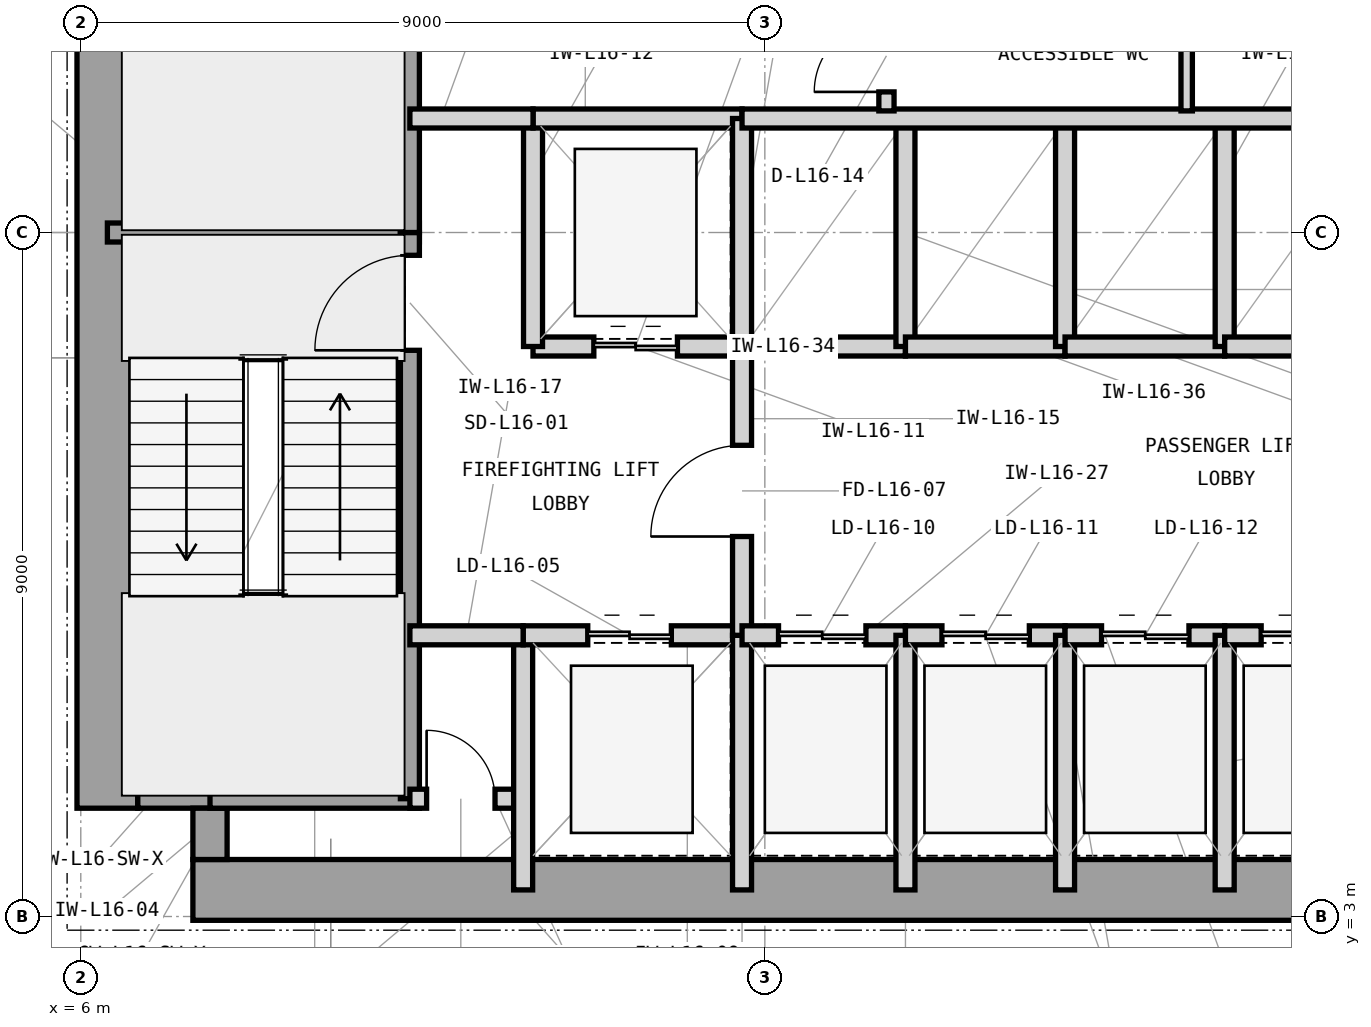
"""IFC4 building model, lengths in metres.
Left out: names, types, materials, properties, quantities, classifications, styles, units other than length and angle.
Written with IfcOpenShell. Run it as: python <this file> out.ifc"""

import sys

from ifc_helpers import new_model, si_unit, direction, frame, frame_2d, origin, place, context, subcontext, project, spatial, rectangle, extrude, element, fill, save


model = new_model("IFC4")
c1 = context("Model", 3, precision=1e-05, world=origin(), true_north=direction((0.0, 1.0)))
c2 = subcontext(c1, "Body", "Model", "MODEL_VIEW")
j1 = project(units=[si_unit("LENGTHUNIT", "METRE"), si_unit("PLANEANGLEUNIT", "RADIAN")], contexts=[c1])
p1 = place(None, origin())
s1 = spatial("IfcSite", under=j1, at=p1, CompositionType="ELEMENT")
p2 = place(p1, origin())
s2 = spatial("IfcBuilding", under=s1, at=p2, CompositionType="ELEMENT")
p3 = place(p2, frame((0.0, 0.0, 72.0)))
s3 = spatial("IfcBuildingStorey", under=s2, at=p3, CompositionType="ELEMENT", Elevation=72.0)
p4 = place(p3, frame((7.475, 3.35, 0.0), z_axis=(0.0, 0.0, 1.0), x_axis=(1.0, 0.0, 0.0)))
e1 = element("IfcWall", 1, at=p4, inside=s3, PredefinedType="SHEAR", context=c2, shape_type="SweptSolid", body=[
    extrude(rectangle(XDim=16.575, YDim=0.8, at=frame_2d((8.288, 0.0))), origin(), (0.0, 0.0, 1.0), 4.2),
])
p5 = place(p3, frame((6.35, 4.425, 0.0), z_axis=(0.0, 0.0, 1.0), x_axis=(0.0, 1.0, 0.0)))
e2 = element("IfcWall", 2, at=p5, inside=s3, PredefinedType="SHEAR", context=c2, shape_type="SweptSolid", body=[
    extrude(rectangle(XDim=15.15, YDim=0.8, at=frame_2d((7.575, 0.0))), origin(), (0.0, 0.0, 1.0), 4.2),
])
p6 = place(p3, frame((6.75, 4.65, 0.0), z_axis=(0.0, 0.0, 1.0), x_axis=(1.0, 0.0, 0.0)))
e3 = element("IfcWall", 3, at=p6, inside=s3, PredefinedType="SHEAR", context=c2, shape_type="SweptSolid", body=[
    extrude(rectangle(XDim=1.175, YDim=0.45, at=frame_2d((0.587, 0.0))), origin(), (0.0, 0.0, 1.0), 4.2),
])
p7 = place(p3, frame((7.7, 3.75, 0.0), z_axis=(0.0, 0.0, 1.0), x_axis=(0.0, 1.0, 0.0)))
e4 = element("IfcWall", 4, at=p7, inside=s3, PredefinedType="SHEAR", context=c2, shape_type="SweptSolid", body=[
    extrude(rectangle(XDim=0.675, YDim=0.45, at=frame_2d((0.337, 0.0))), origin(), (0.0, 0.0, 1.0), 4.2),
])
p8 = place(p3, frame((6.35, 12.0, 0.0), z_axis=(0.0, 0.0, 1.0), x_axis=(1.0, 0.0, 0.0)))
e5 = element("IfcWall", 5, at=p8, inside=s3, PredefinedType="SHEAR", context=c2, shape_type="SweptSolid", body=[
    extrude(rectangle(XDim=4.105, YDim=0.25, at=frame_2d((2.052, 0.0))), origin(), (0.0, 0.0, 1.0), 4.2),
])
p9 = place(p3, frame((7.7, 4.55, 0.0), z_axis=(0.0, 0.0, 1.0), x_axis=(1.0, 0.0, 0.0)))
e6 = element("IfcWall", 6, at=p9, inside=s3, PredefinedType="SHEAR", context=c2, shape_type="SweptSolid", body=[
    extrude(rectangle(XDim=2.755, YDim=0.25, at=frame_2d((1.377, 0.0))), origin(), (0.0, 0.0, 1.0), 4.2),
])
p10 = place(p3, frame((10.33, 4.55, 0.0), z_axis=(0.0, 0.0, 1.0), x_axis=(0.0, 1.0, 0.0)))
e7 = element("IfcWall", 7, at=p10, inside=s3, PredefinedType="SHEAR", context=c2, shape_type="SweptSolid", body=[
    extrude(rectangle(XDim=7.45, YDim=0.25, at=frame_2d((3.725, 0.0))), origin(), (0.0, 0.0, 1.0), 4.2),
])
p11 = place(p10, frame((5.9, 0.0, 0.0)))
e8 = element("IfcOpeningElement", 8, at=p11, cuts=e7, PredefinedType="OPENING", context=c2, shape_type="SweptSolid", body=[
    extrude(rectangle(XDim=1.25, YDim=2.2, at=frame_2d((0.625, 1.1))), frame((0.0, 0.135, 0.0), z_axis=(0.0, -1.0, 0.0), x_axis=(1.0, 0.0, 0.0)), (0.0, 0.0, 1.0), 0.27),
])
p12 = place(p3, frame((10.33, 12.0, 0.0), z_axis=(0.0, 0.0, 1.0), x_axis=(0.0, 1.0, 0.0)))
e9 = element("IfcWall", 9, at=p12, inside=s3, PredefinedType="SHEAR", context=c2, shape_type="SweptSolid", body=[
    extrude(rectangle(XDim=7.45, YDim=0.25, at=frame_2d((3.725, 0.0))), origin(), (0.0, 0.0, 1.0), 4.2),
])
p13 = place(p12, frame((5.85, 0.0, 0.0)))
e10 = element("IfcOpeningElement", 10, at=p13, cuts=e9, PredefinedType="OPENING", context=c2, shape_type="SweptSolid", body=[
    extrude(rectangle(XDim=1.25, YDim=2.2, at=frame_2d((0.625, 1.1))), frame((0.0, 0.135, 0.0), z_axis=(0.0, -1.0, 0.0), x_axis=(1.0, 0.0, 0.0)), (0.0, 0.0, 1.0), 0.27),
])
p14 = place(p3, frame((10.33, 4.55, 0.0), z_axis=(0.0, 0.0, 1.0), x_axis=(1.0, 0.0, 0.0)))
e11 = element("IfcWall", 11, at=p14, inside=s3, PredefinedType="PARTITIONING", context=c2, shape_type="SweptSolid", body=[
    extrude(rectangle(XDim=1.49, YDim=0.25, at=frame_2d((0.745, 0.0))), origin(), (0.0, 0.0, 1.0), 3.97),
])
p15 = place(p14, frame((0.22, 0.0, 0.0)))
e12 = element("IfcOpeningElement", 12, at=p15, cuts=e11, PredefinedType="OPENING", context=c2, shape_type="SweptSolid", body=[
    extrude(rectangle(XDim=0.9, YDim=2.1, at=frame_2d((0.45, 1.05))), frame((0.0, 0.135, 0.0), z_axis=(0.0, -1.0, 0.0), x_axis=(1.0, 0.0, 0.0)), (0.0, 0.0, 1.0), 0.27),
])
p16 = place(p3, frame((11.82, 3.35, 0.0), z_axis=(0.0, 0.0, 1.0), x_axis=(0.0, 1.0, 0.0)))
e13 = element("IfcWall", 13, at=p16, inside=s3, PredefinedType="PARTITIONING", context=c2, shape_type="SweptSolid", body=[
    extrude(rectangle(XDim=3.35, YDim=0.25, at=frame_2d((1.675, 0.0))), origin(), (0.0, 0.0, 1.0), 3.97),
])
p17 = place(p3, frame((11.82, 6.7, 0.0), z_axis=(0.0, 0.0, 1.0), x_axis=(1.0, 0.0, 0.0)))
e14 = element("IfcWall", 14, at=p17, inside=s3, PredefinedType="PARTITIONING", context=c2, shape_type="SweptSolid", body=[
    extrude(rectangle(XDim=2.88, YDim=0.25, at=frame_2d((1.44, 0.0))), origin(), (0.0, 0.0, 1.0), 3.426),
])
p18 = place(p17, frame((0.85, 0.0, 0.0)))
e15 = element("IfcOpeningElement", 15, at=p18, cuts=e14, PredefinedType="OPENING", context=c2, shape_type="SweptSolid", body=[
    extrude(rectangle(XDim=1.1, YDim=2.25, at=frame_2d((0.55, 1.125))), frame((0.0, 0.135, 0.0), z_axis=(0.0, -1.0, 0.0), x_axis=(1.0, 0.0, 0.0)), (0.0, 0.0, 1.0), 0.27),
])
p19 = place(p3, frame((14.7, 3.35, 0.0), z_axis=(0.0, 0.0, 1.0), x_axis=(0.0, 1.0, 0.0)))
e16 = element("IfcWall", 16, at=p19, inside=s3, PredefinedType="PARTITIONING", context=c2, shape_type="SweptSolid", body=[
    extrude(rectangle(XDim=3.35, YDim=0.25, at=frame_2d((1.675, 0.0))), origin(), (0.0, 0.0, 1.0), 3.97),
])
p20 = place(p3, frame((11.95, 10.5, 0.0), z_axis=(0.0, 0.0, 1.0), x_axis=(1.0, 0.0, 0.0)))
e17 = element("IfcWall", 17, at=p20, inside=s3, PredefinedType="PARTITIONING", context=c2, shape_type="SweptSolid", body=[
    extrude(rectangle(XDim=2.75, YDim=0.25, at=frame_2d((1.375, 0.0))), origin(), (0.0, 0.0, 1.0), 3.426),
])
p21 = place(p20, frame((0.8, 0.0, 0.0)))
e18 = element("IfcOpeningElement", 18, at=p21, cuts=e17, PredefinedType="OPENING", context=c2, shape_type="SweptSolid", body=[
    extrude(rectangle(XDim=1.1, YDim=2.25, at=frame_2d((0.55, 1.125))), frame((0.0, 0.135, 0.0), z_axis=(0.0, -1.0, 0.0), x_axis=(1.0, 0.0, 0.0)), (0.0, 0.0, 1.0), 0.27),
])
p22 = place(p3, frame((11.95, 10.5, 0.0), z_axis=(0.0, 0.0, 1.0), x_axis=(0.0, 1.0, 0.0)))
e19 = element("IfcWall", 19, at=p22, inside=s3, PredefinedType="PARTITIONING", context=c2, shape_type="SweptSolid", body=[
    extrude(rectangle(XDim=3.0, YDim=0.25, at=frame_2d((1.5, 0.0))), origin(), (0.0, 0.0, 1.0), 3.97),
])
p23 = place(p3, frame((11.95, 13.5, 0.0), z_axis=(0.0, 0.0, 1.0), x_axis=(1.0, 0.0, 0.0)))
e20 = element("IfcWall", 20, at=p23, inside=s3, PredefinedType="PARTITIONING", context=c2, shape_type="SweptSolid", body=[
    extrude(rectangle(XDim=2.75, YDim=0.25, at=frame_2d((1.375, 0.0))), origin(), (0.0, 0.0, 1.0), 3.426),
])
p24 = place(p3, frame((14.7, 10.5, 0.0), z_axis=(0.0, 0.0, 1.0), x_axis=(0.0, 1.0, 0.0)))
e21 = element("IfcWall", 21, at=p24, inside=s3, PredefinedType="PARTITIONING", context=c2, shape_type="SweptSolid", body=[
    extrude(rectangle(XDim=3.0, YDim=0.25, at=frame_2d((1.5, 0.0))), origin(), (0.0, 0.0, 1.0), 3.97),
])
p25 = place(p3, frame((14.7, 6.7, 0.0), z_axis=(0.0, 0.0, 1.0), x_axis=(0.0, 1.0, 0.0)))
e22 = element("IfcWall", 22, at=p25, inside=s3, PredefinedType="PARTITIONING", context=c2, shape_type="SweptSolid", body=[
    extrude(rectangle(XDim=3.8, YDim=0.25, at=frame_2d((1.9, 0.0))), origin(), (0.0, 0.0, 1.0), 3.97),
])
p26 = place(p25, frame((1.3, 0.0, 0.0)))
e23 = element("IfcOpeningElement", 23, at=p26, cuts=e22, PredefinedType="OPENING", context=c2, shape_type="SweptSolid", body=[
    extrude(rectangle(XDim=1.2, YDim=2.2, at=frame_2d((0.6, 1.1))), frame((0.0, 0.135, 0.0), z_axis=(0.0, -1.0, 0.0), x_axis=(1.0, 0.0, 0.0)), (0.0, 0.0, 1.0), 0.27),
])
p27 = place(p3, frame((10.33, 13.5, 0.0), z_axis=(0.0, 0.0, 1.0), x_axis=(1.0, 0.0, 0.0)))
e24 = element("IfcWall", 24, at=p27, inside=s3, PredefinedType="PARTITIONING", context=c2, shape_type="SweptSolid", body=[
    extrude(rectangle(XDim=1.62, YDim=0.25, at=frame_2d((0.81, 0.0))), origin(), (0.0, 0.0, 1.0), 3.426),
])
p28 = place(p3, frame((10.33, 6.7, 0.0), z_axis=(0.0, 0.0, 1.0), x_axis=(1.0, 0.0, 0.0)))
e25 = element("IfcWall", 25, at=p28, inside=s3, PredefinedType="PARTITIONING", context=c2, shape_type="SweptSolid", body=[
    extrude(rectangle(XDim=1.49, YDim=0.25, at=frame_2d((0.745, 0.0))), origin(), (0.0, 0.0, 1.0), 3.426),
])
p29 = place(p3, frame((14.7, 6.7, 0.0), z_axis=(0.0, 0.0, 1.0), x_axis=(1.0, 0.0, 0.0)))
e26 = element("IfcWall", 26, at=p29, inside=s3, PredefinedType="PARTITIONING", context=c2, shape_type="SweptSolid", body=[
    extrude(rectangle(XDim=2.15, YDim=0.25, at=frame_2d((1.075, 0.0))), origin(), (0.0, 0.0, 1.0), 3.426),
])
p30 = place(p29, frame((0.48, 0.0, 0.0)))
e27 = element("IfcOpeningElement", 27, at=p30, cuts=e26, PredefinedType="OPENING", context=c2, shape_type="SweptSolid", body=[
    extrude(rectangle(XDim=1.15, YDim=2.25, at=frame_2d((0.575, 1.125))), frame((0.0, 0.135, 0.0), z_axis=(0.0, -1.0, 0.0), x_axis=(1.0, 0.0, 0.0)), (0.0, 0.0, 1.0), 0.27),
])
p31 = place(p3, frame((16.85, 3.35, 0.0), z_axis=(0.0, 0.0, 1.0), x_axis=(0.0, 1.0, 0.0)))
e28 = element("IfcWall", 28, at=p31, inside=s3, PredefinedType="PARTITIONING", context=c2, shape_type="SweptSolid", body=[
    extrude(rectangle(XDim=3.35, YDim=0.25, at=frame_2d((1.675, 0.0))), origin(), (0.0, 0.0, 1.0), 3.97),
])
p32 = place(p3, frame((16.85, 6.7, 0.0), z_axis=(0.0, 0.0, 1.0), x_axis=(1.0, 0.0, 0.0)))
e29 = element("IfcWall", 29, at=p32, inside=s3, PredefinedType="PARTITIONING", context=c2, shape_type="SweptSolid", body=[
    extrude(rectangle(XDim=2.1, YDim=0.25, at=frame_2d((1.05, 0.0))), origin(), (0.0, 0.0, 1.0), 3.426),
])
p33 = place(p32, frame((0.48, 0.0, 0.0)))
e30 = element("IfcOpeningElement", 30, at=p33, cuts=e29, PredefinedType="OPENING", context=c2, shape_type="SweptSolid", body=[
    extrude(rectangle(XDim=1.15, YDim=2.25, at=frame_2d((0.575, 1.125))), frame((0.0, 0.135, 0.0), z_axis=(0.0, -1.0, 0.0), x_axis=(1.0, 0.0, 0.0)), (0.0, 0.0, 1.0), 0.27),
])
p34 = place(p3, frame((18.95, 3.35, 0.0), z_axis=(0.0, 0.0, 1.0), x_axis=(0.0, 1.0, 0.0)))
e31 = element("IfcWall", 31, at=p34, inside=s3, PredefinedType="PARTITIONING", context=c2, shape_type="SweptSolid", body=[
    extrude(rectangle(XDim=3.35, YDim=0.25, at=frame_2d((1.675, 0.0))), origin(), (0.0, 0.0, 1.0), 3.97),
])
p35 = place(p3, frame((18.95, 6.7, 0.0), z_axis=(0.0, 0.0, 1.0), x_axis=(1.0, 0.0, 0.0)))
e32 = element("IfcWall", 32, at=p35, inside=s3, PredefinedType="PARTITIONING", context=c2, shape_type="SweptSolid", body=[
    extrude(rectangle(XDim=2.1, YDim=0.25, at=frame_2d((1.05, 0.0))), origin(), (0.0, 0.0, 1.0), 3.426),
])
p36 = place(p35, frame((0.48, 0.0, 0.0)))
e33 = element("IfcOpeningElement", 33, at=p36, cuts=e32, PredefinedType="OPENING", context=c2, shape_type="SweptSolid", body=[
    extrude(rectangle(XDim=1.15, YDim=2.25, at=frame_2d((0.575, 1.125))), frame((0.0, 0.135, 0.0), z_axis=(0.0, -1.0, 0.0), x_axis=(1.0, 0.0, 0.0)), (0.0, 0.0, 1.0), 0.27),
])
p37 = place(p3, frame((21.05, 3.35, 0.0), z_axis=(0.0, 0.0, 1.0), x_axis=(0.0, 1.0, 0.0)))
e34 = element("IfcWall", 34, at=p37, inside=s3, PredefinedType="PARTITIONING", context=c2, shape_type="SweptSolid", body=[
    extrude(rectangle(XDim=3.35, YDim=0.25, at=frame_2d((1.675, 0.0))), origin(), (0.0, 0.0, 1.0), 3.97),
])
p38 = place(p3, frame((21.05, 6.7, 0.0), z_axis=(0.0, 0.0, 1.0), x_axis=(1.0, 0.0, 0.0)))
e35 = element("IfcWall", 35, at=p38, inside=s3, PredefinedType="PARTITIONING", context=c2, shape_type="SweptSolid", body=[
    extrude(rectangle(XDim=2.4, YDim=0.25, at=frame_2d((1.2, 0.0))), origin(), (0.0, 0.0, 1.0), 3.426),
])
p39 = place(p38, frame((0.48, 0.0, 0.0)))
e36 = element("IfcOpeningElement", 36, at=p39, cuts=e35, PredefinedType="OPENING", context=c2, shape_type="SweptSolid", body=[
    extrude(rectangle(XDim=1.15, YDim=2.25, at=frame_2d((0.575, 1.125))), frame((0.0, 0.135, 0.0), z_axis=(0.0, -1.0, 0.0), x_axis=(1.0, 0.0, 0.0)), (0.0, 0.0, 1.0), 0.27),
])
p40 = place(p3, frame((14.7, 10.5, 0.0), z_axis=(0.0, 0.0, 1.0), x_axis=(1.0, 0.0, 0.0)))
e37 = element("IfcWall", 37, at=p40, inside=s3, PredefinedType="PARTITIONING", context=c2, shape_type="SweptSolid", body=[
    extrude(rectangle(XDim=2.15, YDim=0.25, at=frame_2d((1.075, 0.0))), origin(), (0.0, 0.0, 1.0), 3.426),
])
p41 = place(p3, frame((16.85, 10.5, 0.0), z_axis=(0.0, 0.0, 1.0), x_axis=(0.0, 1.0, 0.0)))
e38 = element("IfcWall", 38, at=p41, inside=s3, PredefinedType="PARTITIONING", context=c2, shape_type="SweptSolid", body=[
    extrude(rectangle(XDim=3.0, YDim=0.25, at=frame_2d((1.5, 0.0))), origin(), (0.0, 0.0, 1.0), 3.97),
])
p42 = place(p3, frame((16.85, 10.5, 0.0), z_axis=(0.0, 0.0, 1.0), x_axis=(1.0, 0.0, 0.0)))
e39 = element("IfcWall", 39, at=p42, inside=s3, PredefinedType="PARTITIONING", context=c2, shape_type="SweptSolid", body=[
    extrude(rectangle(XDim=2.1, YDim=0.25, at=frame_2d((1.05, 0.0))), origin(), (0.0, 0.0, 1.0), 3.426),
])
p43 = place(p3, frame((18.95, 10.5, 0.0), z_axis=(0.0, 0.0, 1.0), x_axis=(0.0, 1.0, 0.0)))
e40 = element("IfcWall", 40, at=p43, inside=s3, PredefinedType="PARTITIONING", context=c2, shape_type="SweptSolid", body=[
    extrude(rectangle(XDim=3.0, YDim=0.25, at=frame_2d((1.5, 0.0))), origin(), (0.0, 0.0, 1.0), 3.97),
])
p44 = place(p3, frame((18.95, 10.5, 0.0), z_axis=(0.0, 0.0, 1.0), x_axis=(1.0, 0.0, 0.0)))
e41 = element("IfcWall", 41, at=p44, inside=s3, PredefinedType="PARTITIONING", context=c2, shape_type="SweptSolid", body=[
    extrude(rectangle(XDim=2.1, YDim=0.25, at=frame_2d((1.05, 0.0))), origin(), (0.0, 0.0, 1.0), 3.426),
])
p45 = place(p3, frame((21.05, 10.5, 0.0), z_axis=(0.0, 0.0, 1.0), x_axis=(0.0, 1.0, 0.0)))
e42 = element("IfcWall", 42, at=p45, inside=s3, PredefinedType="PARTITIONING", context=c2, shape_type="SweptSolid", body=[
    extrude(rectangle(XDim=3.0, YDim=0.25, at=frame_2d((1.5, 0.0))), origin(), (0.0, 0.0, 1.0), 3.97),
])
p46 = place(p3, frame((21.05, 10.5, 0.0), z_axis=(0.0, 0.0, 1.0), x_axis=(1.0, 0.0, 0.0)))
e43 = element("IfcWall", 43, at=p46, inside=s3, PredefinedType="PARTITIONING", context=c2, shape_type="SweptSolid", body=[
    extrude(rectangle(XDim=2.4, YDim=0.25, at=frame_2d((1.2, 0.0))), origin(), (0.0, 0.0, 1.0), 3.426),
])
p47 = place(p3, frame((14.7, 13.5, 0.0), z_axis=(0.0, 0.0, 1.0), x_axis=(1.0, 0.0, 0.0)))
e44 = element("IfcWall", 44, at=p47, inside=s3, PredefinedType="PARTITIONING", context=c2, shape_type="SweptSolid", body=[
    extrude(rectangle(XDim=8.95, YDim=0.25, at=frame_2d((4.475, 0.0))), origin(), (0.0, 0.0, 1.0), 3.426),
])
p48 = place(p3, frame((16.6, 13.6, 0.0), z_axis=(0.0, 0.0, 1.0), x_axis=(0.0, 1.0, 0.0)))
e45 = element("IfcWall", 45, at=p48, inside=s3, PredefinedType="PARTITIONING", context=c2, shape_type="SweptSolid", body=[
    extrude(rectangle(XDim=3.0, YDim=0.2, at=frame_2d((1.5, 0.0))), origin(), (0.0, 0.0, 1.0), 3.97),
])
p49 = place(p48, frame((0.25, 0.0, 0.0)))
e46 = element("IfcOpeningElement", 46, at=p49, cuts=e45, PredefinedType="OPENING", context=c2, shape_type="SweptSolid", body=[
    extrude(rectangle(XDim=0.95, YDim=2.1, at=frame_2d((0.475, 1.05))), frame((0.0, 0.11, 0.0), z_axis=(0.0, -1.0, 0.0), x_axis=(1.0, 0.0, 0.0)), (0.0, 0.0, 1.0), 0.22),
])
p50 = place(p48, frame((1.8, 0.0, 0.0)))
e47 = element("IfcOpeningElement", 47, at=p50, cuts=e45, PredefinedType="OPENING", context=c2, shape_type="SweptSolid", body=[
    extrude(rectangle(XDim=0.95, YDim=2.1, at=frame_2d((0.475, 1.05))), frame((0.0, 0.11, 0.0), z_axis=(0.0, -1.0, 0.0), x_axis=(1.0, 0.0, 0.0)), (0.0, 0.0, 1.0), 0.22),
])
p51 = place(p3, frame((20.55, 13.6, 0.0), z_axis=(0.0, 0.0, 1.0), x_axis=(0.0, 1.0, 0.0)))
e48 = element("IfcWall", 48, at=p51, inside=s3, PredefinedType="PARTITIONING", context=c2, shape_type="SweptSolid", body=[
    extrude(rectangle(XDim=3.0, YDim=0.15, at=frame_2d((1.5, 0.0))), origin(), (0.0, 0.0, 1.0), 3.97),
])
p52 = place(p11, origin())
e49 = element("IfcDoor", 49, at=p52, inside=s3, OperationType="SINGLE_SWING_LEFT", PredefinedType="DOOR", context=c2, shape_type="SweptSolid", body=[
    extrude(rectangle(XDim=1.25, YDim=2.2, at=frame_2d((0.625, 1.1))), frame((0.0, 0.025, 0.0), z_axis=(0.0, -1.0, 0.0), x_axis=(1.0, 0.0, 0.0)), (0.0, 0.0, 1.0), 0.05),
])
fill(e8, e49)
p53 = place(p15, origin())
e50 = element("IfcDoor", 50, at=p53, inside=s3, OperationType="SINGLE_SWING_LEFT", PredefinedType="TRAPDOOR", context=c2, shape_type="SweptSolid", body=[
    extrude(rectangle(XDim=0.9, YDim=2.1, at=frame_2d((0.45, 1.05))), frame((0.0, 0.025, 0.0), z_axis=(0.0, -1.0, 0.0), x_axis=(1.0, 0.0, 0.0)), (0.0, 0.0, 1.0), 0.05),
])
fill(e12, e50)
p54 = place(p18, origin())
e51 = element("IfcDoor", 51, at=p54, inside=s3, OperationType="DOUBLE_DOOR_SLIDING", PredefinedType="DOOR", context=c2, shape_type="SweptSolid", body=[
    extrude(rectangle(XDim=1.1, YDim=2.25, at=frame_2d((0.55, 1.125))), frame((0.0, 0.025, 0.0), z_axis=(0.0, -1.0, 0.0), x_axis=(1.0, 0.0, 0.0)), (0.0, 0.0, 1.0), 0.05),
])
fill(e15, e51)
p55 = place(p21, origin())
e52 = element("IfcDoor", 52, at=p55, inside=s3, OperationType="DOUBLE_DOOR_SLIDING", PredefinedType="DOOR", context=c2, shape_type="SweptSolid", body=[
    extrude(rectangle(XDim=1.1, YDim=2.25, at=frame_2d((0.55, 1.125))), frame((0.0, 0.025, 0.0), z_axis=(0.0, -1.0, 0.0), x_axis=(1.0, 0.0, 0.0)), (0.0, 0.0, 1.0), 0.05),
])
fill(e18, e52)
p56 = place(p26, origin())
e53 = element("IfcDoor", 53, at=p56, inside=s3, OperationType="SINGLE_SWING_LEFT", PredefinedType="DOOR", context=c2, shape_type="SweptSolid", body=[
    extrude(rectangle(XDim=1.2, YDim=2.2, at=frame_2d((0.6, 1.1))), frame((0.0, 0.025, 0.0), z_axis=(0.0, -1.0, 0.0), x_axis=(1.0, 0.0, 0.0)), (0.0, 0.0, 1.0), 0.05),
])
fill(e23, e53)
p57 = place(p30, origin())
e54 = element("IfcDoor", 54, at=p57, inside=s3, OperationType="DOUBLE_DOOR_SLIDING", PredefinedType="DOOR", context=c2, shape_type="SweptSolid", body=[
    extrude(rectangle(XDim=1.15, YDim=2.25, at=frame_2d((0.575, 1.125))), frame((0.0, 0.025, 0.0), z_axis=(0.0, -1.0, 0.0), x_axis=(1.0, 0.0, 0.0)), (0.0, 0.0, 1.0), 0.05),
])
fill(e27, e54)
p58 = place(p33, origin())
e55 = element("IfcDoor", 55, at=p58, inside=s3, OperationType="DOUBLE_DOOR_SLIDING", PredefinedType="DOOR", context=c2, shape_type="SweptSolid", body=[
    extrude(rectangle(XDim=1.15, YDim=2.25, at=frame_2d((0.575, 1.125))), frame((0.0, 0.025, 0.0), z_axis=(0.0, -1.0, 0.0), x_axis=(1.0, 0.0, 0.0)), (0.0, 0.0, 1.0), 0.05),
])
fill(e30, e55)
p59 = place(p36, origin())
e56 = element("IfcDoor", 56, at=p59, inside=s3, OperationType="DOUBLE_DOOR_SLIDING", PredefinedType="DOOR", context=c2, shape_type="SweptSolid", body=[
    extrude(rectangle(XDim=1.15, YDim=2.25, at=frame_2d((0.575, 1.125))), frame((0.0, 0.025, 0.0), z_axis=(0.0, -1.0, 0.0), x_axis=(1.0, 0.0, 0.0)), (0.0, 0.0, 1.0), 0.05),
])
fill(e33, e56)
p60 = place(p39, origin())
e57 = element("IfcDoor", 57, at=p60, inside=s3, OperationType="DOUBLE_DOOR_SLIDING", PredefinedType="DOOR", context=c2, shape_type="SweptSolid", body=[
    extrude(rectangle(XDim=1.15, YDim=2.25, at=frame_2d((0.575, 1.125))), frame((0.0, 0.025, 0.0), z_axis=(0.0, -1.0, 0.0), x_axis=(1.0, 0.0, 0.0)), (0.0, 0.0, 1.0), 0.05),
])
fill(e36, e57)
p61 = place(p49, origin())
e58 = element("IfcDoor", 58, at=p61, inside=s3, OperationType="SINGLE_SWING_LEFT", PredefinedType="DOOR", context=c2, shape_type="SweptSolid", body=[
    extrude(rectangle(XDim=0.95, YDim=2.1, at=frame_2d((0.475, 1.05))), frame((0.0, 0.025, 0.0), z_axis=(0.0, -1.0, 0.0), x_axis=(1.0, 0.0, 0.0)), (0.0, 0.0, 1.0), 0.05),
])
fill(e46, e58)
save(model, sys.argv[1])
